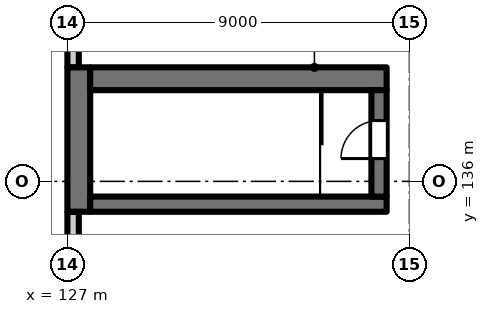
"""IFC4 building model, lengths in metres.
Left out: names, types, materials, properties, quantities, classifications, styles, units other than length and angle.
Written with IfcOpenShell. Run it as: python <this file> out.ifc"""

import sys

from ifc_helpers import new_model, si_unit, direction, frame, frame_2d, origin, place, context, subcontext, project, spatial, rectangle, extrude, element, fill, save


model = new_model("IFC4")
c1 = context("Model", 3, precision=1e-05, world=origin(), true_north=direction((0.0, 1.0)))
c2 = subcontext(c1, "Body", "Model", "MODEL_VIEW")
j1 = project(units=[si_unit("LENGTHUNIT", "METRE"), si_unit("PLANEANGLEUNIT", "RADIAN")], contexts=[c1])
p1 = place(None, origin())
s1 = spatial("IfcSite", under=j1, at=p1, CompositionType="ELEMENT")
p2 = place(p1, origin())
s2 = spatial("IfcBuilding", under=s1, at=p2, CompositionType="ELEMENT")
p3 = place(p2, frame((0.0, 0.0, 113.0)))
s3 = spatial("IfcBuildingStorey", under=s2, at=p3, CompositionType="ELEMENT", Elevation=113.0)
p4 = place(p3, frame((127.3, 135.2, 0.0), z_axis=(0.0, 0.0, 1.0), x_axis=(0.0, 1.0, 0.0)))
e1 = element("IfcWall", 1, at=p4, inside=s3, PredefinedType="SHEAR", context=c2, shape_type="SweptSolid", body=[
    extrude(rectangle(XDim=3.8, YDim=0.6, at=frame_2d((1.9, 0.0))), origin(), (0.0, 0.0, 1.0), 4.0),
])
p5 = place(p3, frame((127.6, 138.7, 0.0), z_axis=(0.0, 0.0, 1.0), x_axis=(1.0, 0.0, 0.0)))
e2 = element("IfcWall", 2, at=p5, inside=s3, PredefinedType="SHEAR", context=c2, shape_type="SweptSolid", body=[
    extrude(rectangle(XDim=7.8, YDim=0.6, at=frame_2d((3.9, 0.0))), origin(), (0.0, 0.0, 1.0), 4.0),
])
p6 = place(p3, frame((127.6, 135.4, 0.0), z_axis=(0.0, 0.0, 1.0), x_axis=(1.0, 0.0, 0.0)))
e3 = element("IfcWall", 3, at=p6, inside=s3, PredefinedType="SHEAR", context=c2, shape_type="SweptSolid", body=[
    extrude(rectangle(XDim=7.8, YDim=0.4, at=frame_2d((3.9, 0.0))), origin(), (0.0, 0.0, 1.0), 4.0),
])
p7 = place(p3, frame((135.2, 135.6, 0.0), z_axis=(0.0, 0.0, 1.0), x_axis=(0.0, 1.0, 0.0)))
e4 = element("IfcWall", 4, at=p7, inside=s3, PredefinedType="SHEAR", context=c2, shape_type="SweptSolid", body=[
    extrude(rectangle(XDim=2.8, YDim=0.4, at=frame_2d((1.4, 0.0))), origin(), (0.0, 0.0, 1.0), 4.0),
])
p8 = place(p7, frame((1.0, 0.0, 0.0)))
e5 = element("IfcOpeningElement", 5, at=p8, cuts=e4, PredefinedType="OPENING", context=c2, shape_type="SweptSolid", body=[
    extrude(rectangle(XDim=1.0, YDim=2.1, at=frame_2d((0.5, 1.05))), frame((0.0, 0.21, 0.0), z_axis=(0.0, -1.0, 0.0), x_axis=(1.0, 0.0, 0.0)), (0.0, 0.0, 1.0), 0.42),
])
p9 = place(p3, frame((127.15, 142.0, 0.0), z_axis=(0.0, 0.0, 1.0), x_axis=(0.0, -1.0, 0.0)))
e6 = element("IfcWall", 6, at=p9, inside=s3, PredefinedType="PARAPET", context=c2, shape_type="SweptSolid", body=[
    extrude(rectangle(XDim=2.995, YDim=0.3, at=frame_2d((1.498, 0.0))), origin(), (0.0, 0.0, 1.0), 1.1),
])
p10 = place(p3, frame((127.15, 135.195, 0.0), z_axis=(0.0, 0.0, 1.0), x_axis=(0.0, -1.0, 0.0)))
e7 = element("IfcWall", 7, at=p10, inside=s3, PredefinedType="PARAPET", context=c2, shape_type="SweptSolid", body=[
    extrude(rectangle(XDim=14.39, YDim=0.3, at=frame_2d((7.195, 0.0))), origin(), (0.0, 0.0, 1.0), 1.1),
])
p11 = place(p8, origin())
e8 = element("IfcDoor", 8, at=p11, inside=s3, OperationType="SINGLE_SWING_LEFT", PredefinedType="DOOR", context=c2, shape_type="SweptSolid", body=[
    extrude(rectangle(XDim=1.0, YDim=2.1, at=frame_2d((0.5, 1.05))), frame((0.0, 0.025, 0.0), z_axis=(0.0, -1.0, 0.0), x_axis=(1.0, 0.0, 0.0)), (0.0, 0.0, 1.0), 0.05),
])
fill(e5, e8)
save(model, sys.argv[1])
